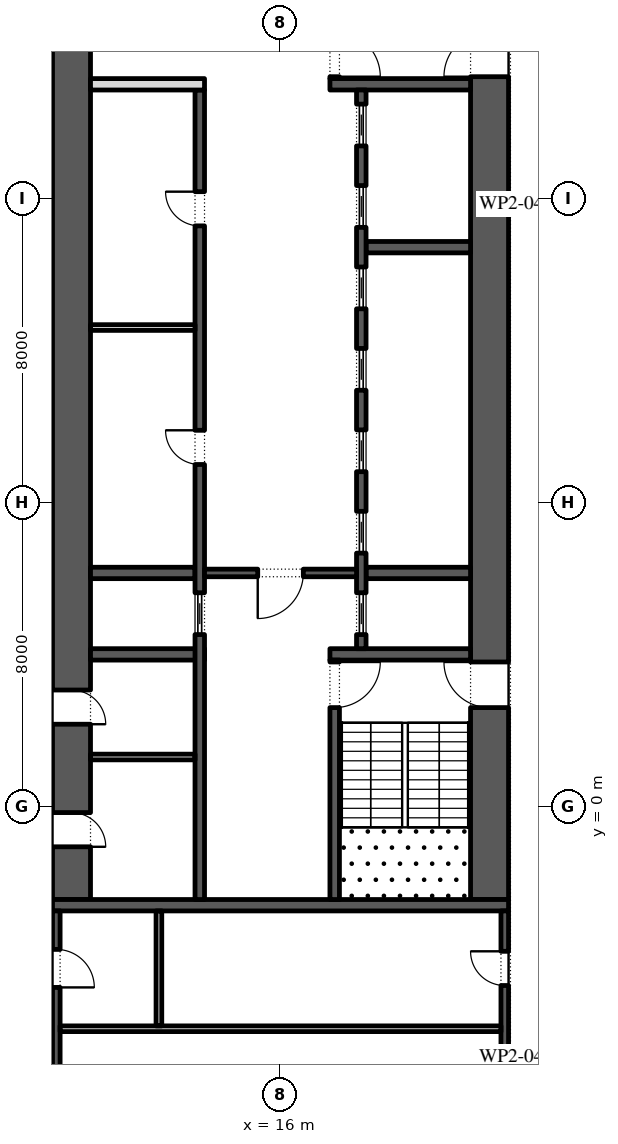
"""IFC4 building model, lengths in metres.
Left out: names, types, materials, properties, quantities, classifications, styles, units other than length and angle.
Written with IfcOpenShell. Run it as: python <this file> out.ifc"""

import sys

from ifc_helpers import new_model, si_unit, direction, frame, frame_2d, origin, place, context, subcontext, project, spatial, rectangle, extrude, element, fill, save


model = new_model("IFC4")
c1 = context("Model", 3, precision=1e-05, world=origin(), true_north=direction((0.0, 1.0)))
c2 = subcontext(c1, "Body", "Model", "MODEL_VIEW")
j1 = project(units=[si_unit("LENGTHUNIT", "METRE"), si_unit("PLANEANGLEUNIT", "RADIAN")], contexts=[c1])
p1 = place(None, origin())
s1 = spatial("IfcSite", under=j1, at=p1, CompositionType="ELEMENT")
p2 = place(p1, origin())
s2 = spatial("IfcBuilding", under=s1, at=p2, CompositionType="ELEMENT")
p3 = place(p2, frame((0.0, 0.0, 69.0)))
s3 = spatial("IfcBuildingStorey", under=s2, at=p3, CompositionType="ELEMENT", Elevation=69.0)
p4 = place(p3, frame((21.5, -2.45, 0.0), z_axis=(0.0, 0.0, 1.0), x_axis=(0.0, 1.0, 0.0)))
e1 = element("IfcWall", 1, at=p4, inside=s3, PredefinedType="SHEAR", context=c2, shape_type="SweptSolid", body=[
    extrude(rectangle(XDim=27.9, YDim=1.0, at=frame_2d((13.95, 0.0))), origin(), (0.0, 0.0, 1.0), 4.0),
])
p5 = place(p4, frame((5.05, 0.0, 0.0)))
e2 = element("IfcOpeningElement", 2, at=p5, cuts=e1, PredefinedType="OPENING", context=c2, shape_type="SweptSolid", body=[
    extrude(rectangle(XDim=1.2, YDim=2.1, at=frame_2d((0.6, 1.05))), frame((0.0, 0.51, 0.0), z_axis=(0.0, -1.0, 0.0), x_axis=(1.0, 0.0, 0.0)), (0.0, 0.0, 1.0), 1.02),
])
p6 = place(p4, frame((21.65, 0.0, 0.0)))
e3 = element("IfcOpeningElement", 3, at=p6, cuts=e1, PredefinedType="OPENING", context=c2, shape_type="SweptSolid", body=[
    extrude(rectangle(XDim=1.2, YDim=2.1, at=frame_2d((0.6, 1.05))), frame((0.0, 0.51, 0.0), z_axis=(0.0, -1.0, 0.0), x_axis=(1.0, 0.0, 0.0)), (0.0, 0.0, 1.0), 1.02),
])
p7 = place(p3, frame((10.5, -2.45, 0.0), z_axis=(0.0, 0.0, 1.0), x_axis=(0.0, 1.0, 0.0)))
e4 = element("IfcWall", 4, at=p7, inside=s3, PredefinedType="SHEAR", context=c2, shape_type="SweptSolid", body=[
    extrude(rectangle(XDim=27.9, YDim=1.0, at=frame_2d((13.95, 0.0))), origin(), (0.0, 0.0, 1.0), 4.0),
])
p8 = place(p7, frame((23.65, 0.0, 0.0)))
e5 = element("IfcOpeningElement", 5, at=p8, cuts=e4, PredefinedType="OPENING", context=c2, shape_type="SweptSolid", body=[
    extrude(rectangle(XDim=2.4, YDim=2.1, at=frame_2d((1.2, 1.05))), frame((0.0, 0.51, 0.0), z_axis=(0.0, -1.0, 0.0), x_axis=(1.0, 0.0, 0.0)), (0.0, 0.0, 1.0), 1.02),
])
p9 = place(p7, frame((1.387, 0.0, 0.0)))
e6 = element("IfcOpeningElement", 6, at=p9, cuts=e4, PredefinedType="OPENING", context=c2, shape_type="SweptSolid", body=[
    extrude(rectangle(XDim=0.9, YDim=2.1, at=frame_2d((0.45, 1.05))), frame((0.0, 0.51, 0.0), z_axis=(0.0, -1.0, 0.0), x_axis=(1.0, 0.0, 0.0)), (0.0, 0.0, 1.0), 1.02),
])
p10 = place(p7, frame((4.613, 0.0, 0.0)))
e7 = element("IfcOpeningElement", 7, at=p10, cuts=e4, PredefinedType="OPENING", context=c2, shape_type="SweptSolid", body=[
    extrude(rectangle(XDim=0.9, YDim=2.1, at=frame_2d((0.45, 1.05))), frame((0.0, 0.51, 0.0), z_axis=(0.0, -1.0, 0.0), x_axis=(1.0, 0.0, 0.0)), (0.0, 0.0, 1.0), 1.02),
])
p11 = place(p3, frame((10.0, -2.6, 0.0), z_axis=(0.0, 0.0, 1.0), x_axis=(1.0, 0.0, 0.0)))
e8 = element("IfcWall", 8, at=p11, inside=s3, PredefinedType="SHEAR", context=c2, shape_type="SweptSolid", body=[
    extrude(rectangle(XDim=12.0, YDim=0.3, at=frame_2d((6.0, 0.0))), origin(), (0.0, 0.0, 1.0), 4.0),
])
p12 = place(p3, frame((17.3, 4.0, 0.0), z_axis=(0.0, 0.0, 1.0), x_axis=(1.0, 0.0, 0.0)))
e9 = element("IfcWall", 9, at=p12, inside=s3, PredefinedType="SHEAR", context=c2, shape_type="SweptSolid", body=[
    extrude(rectangle(XDim=3.7, YDim=0.3, at=frame_2d((1.85, 0.0))), origin(), (0.0, 0.0, 1.0), 4.0),
])
p13 = place(p3, frame((17.425, -2.45, 0.0), z_axis=(0.0, 0.0, 1.0), x_axis=(0.0, 1.0, 0.0)))
e10 = element("IfcWall", 10, at=p13, inside=s3, PredefinedType="SHEAR", context=c2, shape_type="SweptSolid", body=[
    extrude(rectangle(XDim=6.3, YDim=0.25, at=frame_2d((3.15, 0.0))), origin(), (0.0, 0.0, 1.0), 4.0),
])
p14 = place(p13, frame((5.05, 0.0, 0.0)))
e11 = element("IfcOpeningElement", 11, at=p14, cuts=e10, PredefinedType="OPENING", context=c2, shape_type="SweptSolid", body=[
    extrude(rectangle(XDim=1.2, YDim=2.1, at=frame_2d((0.6, 1.05))), frame((0.0, 0.135, 0.0), z_axis=(0.0, -1.0, 0.0), x_axis=(1.0, 0.0, 0.0)), (0.0, 0.0, 1.0), 0.27),
])
p15 = place(p3, frame((17.3, 19.0, 0.0), z_axis=(0.0, 0.0, 1.0), x_axis=(1.0, 0.0, 0.0)))
e12 = element("IfcWall", 12, at=p15, inside=s3, PredefinedType="SHEAR", context=c2, shape_type="SweptSolid", body=[
    extrude(rectangle(XDim=3.7, YDim=0.3, at=frame_2d((1.85, 0.0))), origin(), (0.0, 0.0, 1.0), 4.0),
])
p16 = place(p3, frame((17.425, 19.15, 0.0), z_axis=(0.0, 0.0, 1.0), x_axis=(0.0, 1.0, 0.0)))
e13 = element("IfcWall", 13, at=p16, inside=s3, PredefinedType="SHEAR", context=c2, shape_type="SweptSolid", body=[
    extrude(rectangle(XDim=6.3, YDim=0.25, at=frame_2d((3.15, 0.0))), origin(), (0.0, 0.0, 1.0), 4.0),
])
p17 = place(p16, frame((0.05, 0.0, 0.0)))
e14 = element("IfcOpeningElement", 14, at=p17, cuts=e13, PredefinedType="OPENING", context=c2, shape_type="SweptSolid", body=[
    extrude(rectangle(XDim=1.2, YDim=2.1, at=frame_2d((0.6, 1.05))), frame((0.0, 0.135, 0.0), z_axis=(0.0, -1.0, 0.0), x_axis=(1.0, 0.0, 0.0)), (0.0, 0.0, 1.0), 0.27),
])
for number, where, z_axis, x_axis in (
    (15, (18.25, 6.143, 0.0), (0.0, 0.0, 1.0), (1.0, 0.0, 0.0)),
    (16, (18.25, 14.714, 0.0), (0.0, 0.0, 1.0), (1.0, 0.0, 0.0)),
):
    element("IfcWall", number, at=place(p3, frame(where, z_axis=z_axis, x_axis=x_axis)), inside=s3, PredefinedType="SHEAR", context=c2, shape_type="SweptSolid", body=[
        extrude(rectangle(XDim=2.75, YDim=0.3, at=frame_2d((1.375, 0.0))), origin(), (0.0, 0.0, 1.0), 4.0),
    ])
p18 = place(p3, frame((18.125, 4.15, 0.0), z_axis=(0.0, 0.0, 1.0), x_axis=(0.0, 1.0, 0.0)))
e17 = element("IfcWall", 17, at=p18, inside=s3, PredefinedType="SHEAR", context=c2, shape_type="SweptSolid", body=[
    extrude(rectangle(XDim=14.7, YDim=0.25, at=frame_2d((7.35, 0.0))), origin(), (0.0, 0.0, 1.0), 4.0),
])
p19 = place(p18, frame((0.371, 0.0, 0.0)))
e18 = element("IfcOpeningElement", 18, at=p19, cuts=e17, PredefinedType="OPENING", context=c2, shape_type="SweptSolid", body=[
    extrude(rectangle(XDim=1.1, YDim=2.1, at=frame_2d((0.55, 1.05))), frame((0.0, 0.135, 0.0), z_axis=(0.0, -1.0, 0.0), x_axis=(1.0, 0.0, 0.0)), (0.0, 0.0, 1.0), 0.27),
])
p20 = place(p18, frame((2.514, 0.0, 0.0)))
e19 = element("IfcOpeningElement", 19, at=p20, cuts=e17, PredefinedType="OPENING", context=c2, shape_type="SweptSolid", body=[
    extrude(rectangle(XDim=1.1, YDim=2.1, at=frame_2d((0.55, 1.05))), frame((0.0, 0.135, 0.0), z_axis=(0.0, -1.0, 0.0), x_axis=(1.0, 0.0, 0.0)), (0.0, 0.0, 1.0), 0.27),
])
p21 = place(p18, frame((4.657, 0.0, 0.0)))
e20 = element("IfcOpeningElement", 20, at=p21, cuts=e17, PredefinedType="OPENING", context=c2, shape_type="SweptSolid", body=[
    extrude(rectangle(XDim=1.1, YDim=2.1, at=frame_2d((0.55, 1.05))), frame((0.0, 0.135, 0.0), z_axis=(0.0, -1.0, 0.0), x_axis=(1.0, 0.0, 0.0)), (0.0, 0.0, 1.0), 0.27),
])
p22 = place(p18, frame((6.8, 0.0, 0.0)))
e21 = element("IfcOpeningElement", 21, at=p22, cuts=e17, PredefinedType="OPENING", context=c2, shape_type="SweptSolid", body=[
    extrude(rectangle(XDim=1.1, YDim=2.1, at=frame_2d((0.55, 1.05))), frame((0.0, 0.135, 0.0), z_axis=(0.0, -1.0, 0.0), x_axis=(1.0, 0.0, 0.0)), (0.0, 0.0, 1.0), 0.27),
])
p23 = place(p18, frame((8.943, 0.0, 0.0)))
e22 = element("IfcOpeningElement", 22, at=p23, cuts=e17, PredefinedType="OPENING", context=c2, shape_type="SweptSolid", body=[
    extrude(rectangle(XDim=1.1, YDim=2.1, at=frame_2d((0.55, 1.05))), frame((0.0, 0.135, 0.0), z_axis=(0.0, -1.0, 0.0), x_axis=(1.0, 0.0, 0.0)), (0.0, 0.0, 1.0), 0.27),
])
p24 = place(p18, frame((11.086, 0.0, 0.0)))
e23 = element("IfcOpeningElement", 23, at=p24, cuts=e17, PredefinedType="OPENING", context=c2, shape_type="SweptSolid", body=[
    extrude(rectangle(XDim=1.1, YDim=2.1, at=frame_2d((0.55, 1.05))), frame((0.0, 0.135, 0.0), z_axis=(0.0, -1.0, 0.0), x_axis=(1.0, 0.0, 0.0)), (0.0, 0.0, 1.0), 0.27),
])
p25 = place(p18, frame((13.229, 0.0, 0.0)))
e24 = element("IfcOpeningElement", 24, at=p25, cuts=e17, PredefinedType="OPENING", context=c2, shape_type="SweptSolid", body=[
    extrude(rectangle(XDim=1.1, YDim=2.1, at=frame_2d((0.55, 1.05))), frame((0.0, 0.135, 0.0), z_axis=(0.0, -1.0, 0.0), x_axis=(1.0, 0.0, 0.0)), (0.0, 0.0, 1.0), 0.27),
])
p26 = place(p3, frame((11.0, 4.0, 0.0), z_axis=(0.0, 0.0, 1.0), x_axis=(1.0, 0.0, 0.0)))
e25 = element("IfcWall", 25, at=p26, inside=s3, PredefinedType="SHEAR", context=c2, shape_type="SweptSolid", body=[
    extrude(rectangle(XDim=3.0, YDim=0.3, at=frame_2d((1.5, 0.0))), origin(), (0.0, 0.0, 1.0), 4.0),
])
p27 = place(p3, frame((11.0, 6.143, 0.0), z_axis=(0.0, 0.0, 1.0), x_axis=(1.0, 0.0, 0.0)))
e26 = element("IfcWall", 26, at=p27, inside=s3, PredefinedType="SHEAR", context=c2, shape_type="SweptSolid", body=[
    extrude(rectangle(XDim=2.75, YDim=0.3, at=frame_2d((1.375, 0.0))), origin(), (0.0, 0.0, 1.0), 4.0),
])
p28 = place(p3, frame((13.875, -2.45, 0.0), z_axis=(0.0, 0.0, 1.0), x_axis=(0.0, 1.0, 0.0)))
e27 = element("IfcWall", 27, at=p28, inside=s3, PredefinedType="SHEAR", context=c2, shape_type="SweptSolid", body=[
    extrude(rectangle(XDim=21.3, YDim=0.25, at=frame_2d((10.65, 0.0))), origin(), (0.0, 0.0, 1.0), 4.0),
])
p29 = place(p28, frame((11.446, 0.0, 0.0)))
e28 = element("IfcOpeningElement", 28, at=p29, cuts=e27, PredefinedType="OPENING", context=c2, shape_type="SweptSolid", body=[
    extrude(rectangle(XDim=0.9, YDim=2.1, at=frame_2d((0.45, 1.05))), frame((0.0, 0.135, 0.0), z_axis=(0.0, -1.0, 0.0), x_axis=(1.0, 0.0, 0.0)), (0.0, 0.0, 1.0), 0.27),
])
p30 = place(p28, frame((17.725, 0.0, 0.0)))
e29 = element("IfcOpeningElement", 29, at=p30, cuts=e27, PredefinedType="OPENING", context=c2, shape_type="SweptSolid", body=[
    extrude(rectangle(XDim=0.9, YDim=2.1, at=frame_2d((0.45, 1.05))), frame((0.0, 0.135, 0.0), z_axis=(0.0, -1.0, 0.0), x_axis=(1.0, 0.0, 0.0)), (0.0, 0.0, 1.0), 0.27),
])
p31 = place(p28, frame((6.971, 0.0, 0.0)))
e30 = element("IfcOpeningElement", 30, at=p31, cuts=e27, PredefinedType="OPENING", context=c2, shape_type="SweptSolid", body=[
    extrude(rectangle(XDim=1.1, YDim=2.1, at=frame_2d((0.55, 1.05))), frame((0.0, 0.135, 0.0), z_axis=(0.0, -1.0, 0.0), x_axis=(1.0, 0.0, 0.0)), (0.0, 0.0, 1.0), 0.27),
])
p32 = place(p3, frame((11.0, 19.0, 0.0), z_axis=(0.0, 0.0, 1.0), x_axis=(1.0, 0.0, 0.0)))
e31 = element("IfcWall", 31, at=p32, inside=s3, PredefinedType="PARTITIONING", context=c2, shape_type="SweptSolid", body=[
    extrude(rectangle(XDim=3.0, YDim=0.3, at=frame_2d((1.5, 0.0))), origin(), (0.0, 0.0, 1.0), 4.0),
])
p33 = place(p3, frame((11.0, 12.6, 0.0), z_axis=(0.0, 0.0, 1.0), x_axis=(1.0, 0.0, 0.0)))
e32 = element("IfcWall", 32, at=p33, inside=s3, PredefinedType="PARTITIONING", context=c2, shape_type="SweptSolid", body=[
    extrude(rectangle(XDim=2.75, YDim=0.15, at=frame_2d((1.375, 0.0))), origin(), (0.0, 0.0, 1.0), 4.0),
])
p34 = place(p3, frame((14.0, 6.143, 0.0), z_axis=(0.0, 0.0, 1.0), x_axis=(1.0, 0.0, 0.0)))
e33 = element("IfcWall", 33, at=p34, inside=s3, PredefinedType="SHEAR", context=c2, shape_type="SweptSolid", body=[
    extrude(rectangle(XDim=4.0, YDim=0.2, at=frame_2d((2.0, 0.0))), origin(), (0.0, 0.0, 1.0), 4.0),
])
p35 = place(p34, frame((1.4, 0.0, 0.0)))
e34 = element("IfcOpeningElement", 34, at=p35, cuts=e33, PredefinedType="OPENING", context=c2, shape_type="SweptSolid", body=[
    extrude(rectangle(XDim=1.2, YDim=2.1, at=frame_2d((0.6, 1.05))), frame((0.0, 0.11, 0.0), z_axis=(0.0, -1.0, 0.0), x_axis=(1.0, 0.0, 0.0)), (0.0, 0.0, 1.0), 0.22),
])
p36 = place(p3, frame((11.0, 1.3, 0.0), z_axis=(0.0, 0.0, 1.0), x_axis=(1.0, 0.0, 0.0)))
e35 = element("IfcWall", 35, at=p36, inside=s3, PredefinedType="PARTITIONING", context=c2, shape_type="SweptSolid", body=[
    extrude(rectangle(XDim=2.75, YDim=0.15, at=frame_2d((1.375, 0.0))), origin(), (0.0, 0.0, 1.0), 4.0),
])
p37 = place(p3, frame((21.9, -15.8, 0.0), z_axis=(0.0, 0.0, 1.0), x_axis=(0.0, 1.0, 0.0)))
e36 = element("IfcWall", 36, at=p37, inside=s3, PredefinedType="SHEAR", context=c2, shape_type="SweptSolid", body=[
    extrude(rectangle(XDim=13.05, YDim=0.2, at=frame_2d((6.525, 0.0))), origin(), (0.0, 0.0, 1.0), 4.0),
])
p38 = place(p37, frame((11.087, 0.0, 0.0)))
e37 = element("IfcOpeningElement", 37, at=p38, cuts=e36, PredefinedType="OPENING", context=c2, shape_type="SweptSolid", body=[
    extrude(rectangle(XDim=0.9, YDim=2.1, at=frame_2d((0.45, 1.05))), frame((0.0, 0.11, 0.0), z_axis=(0.0, -1.0, 0.0), x_axis=(1.0, 0.0, 0.0)), (0.0, 0.0, 1.0), 0.22),
])
p39 = place(p3, frame((10.1, -15.8, 0.0), z_axis=(0.0, 0.0, 1.0), x_axis=(0.0, 1.0, 0.0)))
e38 = element("IfcWall", 38, at=p39, inside=s3, PredefinedType="SHEAR", context=c2, shape_type="SweptSolid", body=[
    extrude(rectangle(XDim=13.05, YDim=0.2, at=frame_2d((6.525, 0.0))), origin(), (0.0, 0.0, 1.0), 4.0),
])
p40 = place(p39, frame((4.488, 0.0, 0.0)))
e39 = element("IfcOpeningElement", 39, at=p40, cuts=e38, PredefinedType="OPENING", context=c2, shape_type="SweptSolid", body=[
    extrude(rectangle(XDim=0.9, YDim=2.1, at=frame_2d((0.45, 1.05))), frame((0.0, 0.11, 0.0), z_axis=(0.0, -1.0, 0.0), x_axis=(1.0, 0.0, 0.0)), (0.0, 0.0, 1.0), 0.22),
])
p41 = place(p39, frame((11.038, 0.0, 0.0)))
e40 = element("IfcOpeningElement", 40, at=p41, cuts=e38, PredefinedType="OPENING", context=c2, shape_type="SweptSolid", body=[
    extrude(rectangle(XDim=1.0, YDim=2.1, at=frame_2d((0.5, 1.05))), frame((0.0, 0.11, 0.0), z_axis=(0.0, -1.0, 0.0), x_axis=(1.0, 0.0, 0.0)), (0.0, 0.0, 1.0), 0.22),
])
p42 = place(p3, frame((10.2, -5.85, 0.0), z_axis=(0.0, 0.0, 1.0), x_axis=(1.0, 0.0, 0.0)))
e41 = element("IfcWall", 41, at=p42, inside=s3, PredefinedType="PARTITIONING", context=c2, shape_type="SweptSolid", body=[
    extrude(rectangle(XDim=11.6, YDim=0.15, at=frame_2d((5.8, 0.0))), origin(), (0.0, 0.0, 1.0), 4.0),
])
p43 = place(p3, frame((12.8, -5.775, 0.0), z_axis=(0.0, 0.0, 1.0), x_axis=(0.0, 1.0, 0.0)))
e42 = element("IfcWall", 42, at=p43, inside=s3, PredefinedType="PARTITIONING", context=c2, shape_type="SweptSolid", body=[
    extrude(rectangle(XDim=3.025, YDim=0.15, at=frame_2d((1.512, 0.0))), origin(), (0.0, 0.0, 1.0), 4.0),
])
p44 = place(p19, origin())
e43 = element("IfcDoor", 43, at=p44, inside=s3, OperationType="SLIDING_TO_LEFT", PredefinedType="DOOR", context=c2, shape_type="SweptSolid", body=[
    extrude(rectangle(XDim=1.1, YDim=2.1, at=frame_2d((0.55, 1.05))), frame((0.0, 0.025, 0.0), z_axis=(0.0, -1.0, 0.0), x_axis=(1.0, 0.0, 0.0)), (0.0, 0.0, 1.0), 0.05),
])
fill(e18, e43)
p45 = place(p20, origin())
e44 = element("IfcDoor", 44, at=p45, inside=s3, OperationType="SLIDING_TO_LEFT", PredefinedType="DOOR", context=c2, shape_type="SweptSolid", body=[
    extrude(rectangle(XDim=1.1, YDim=2.1, at=frame_2d((0.55, 1.05))), frame((0.0, 0.025, 0.0), z_axis=(0.0, -1.0, 0.0), x_axis=(1.0, 0.0, 0.0)), (0.0, 0.0, 1.0), 0.05),
])
fill(e19, e44)
p46 = place(p21, origin())
e45 = element("IfcDoor", 45, at=p46, inside=s3, OperationType="SLIDING_TO_LEFT", PredefinedType="DOOR", context=c2, shape_type="SweptSolid", body=[
    extrude(rectangle(XDim=1.1, YDim=2.1, at=frame_2d((0.55, 1.05))), frame((0.0, 0.025, 0.0), z_axis=(0.0, -1.0, 0.0), x_axis=(1.0, 0.0, 0.0)), (0.0, 0.0, 1.0), 0.05),
])
fill(e20, e45)
p47 = place(p22, origin())
e46 = element("IfcDoor", 46, at=p47, inside=s3, OperationType="SLIDING_TO_LEFT", PredefinedType="DOOR", context=c2, shape_type="SweptSolid", body=[
    extrude(rectangle(XDim=1.1, YDim=2.1, at=frame_2d((0.55, 1.05))), frame((0.0, 0.025, 0.0), z_axis=(0.0, -1.0, 0.0), x_axis=(1.0, 0.0, 0.0)), (0.0, 0.0, 1.0), 0.05),
])
fill(e21, e46)
p48 = place(p23, origin())
e47 = element("IfcDoor", 47, at=p48, inside=s3, OperationType="SLIDING_TO_LEFT", PredefinedType="DOOR", context=c2, shape_type="SweptSolid", body=[
    extrude(rectangle(XDim=1.1, YDim=2.1, at=frame_2d((0.55, 1.05))), frame((0.0, 0.025, 0.0), z_axis=(0.0, -1.0, 0.0), x_axis=(1.0, 0.0, 0.0)), (0.0, 0.0, 1.0), 0.05),
])
fill(e22, e47)
p49 = place(p24, origin())
e48 = element("IfcDoor", 48, at=p49, inside=s3, OperationType="SLIDING_TO_LEFT", PredefinedType="DOOR", context=c2, shape_type="SweptSolid", body=[
    extrude(rectangle(XDim=1.1, YDim=2.1, at=frame_2d((0.55, 1.05))), frame((0.0, 0.025, 0.0), z_axis=(0.0, -1.0, 0.0), x_axis=(1.0, 0.0, 0.0)), (0.0, 0.0, 1.0), 0.05),
])
fill(e23, e48)
p50 = place(p25, origin())
e49 = element("IfcDoor", 49, at=p50, inside=s3, OperationType="SLIDING_TO_LEFT", PredefinedType="DOOR", context=c2, shape_type="SweptSolid", body=[
    extrude(rectangle(XDim=1.1, YDim=2.1, at=frame_2d((0.55, 1.05))), frame((0.0, 0.025, 0.0), z_axis=(0.0, -1.0, 0.0), x_axis=(1.0, 0.0, 0.0)), (0.0, 0.0, 1.0), 0.05),
])
fill(e24, e49)
p51 = place(p29, origin())
e50 = element("IfcDoor", 50, at=p51, inside=s3, OperationType="SINGLE_SWING_LEFT", PredefinedType="DOOR", context=c2, shape_type="SweptSolid", body=[
    extrude(rectangle(XDim=0.9, YDim=2.1, at=frame_2d((0.45, 1.05))), frame((0.0, 0.125, 0.0), z_axis=(0.0, -1.0, 0.0), x_axis=(1.0, 0.0, 0.0)), (0.0, 0.0, 1.0), 0.05),
])
fill(e28, e50)
p52 = place(p30, origin())
e51 = element("IfcDoor", 51, at=p52, inside=s3, OperationType="SINGLE_SWING_LEFT", PredefinedType="DOOR", context=c2, shape_type="SweptSolid", body=[
    extrude(rectangle(XDim=0.9, YDim=2.1, at=frame_2d((0.45, 1.05))), frame((0.0, 0.125, 0.0), z_axis=(0.0, -1.0, 0.0), x_axis=(1.0, 0.0, 0.0)), (0.0, 0.0, 1.0), 0.05),
])
fill(e29, e51)
p53 = place(p31, origin())
e52 = element("IfcDoor", 52, at=p53, inside=s3, OperationType="SLIDING_TO_LEFT", PredefinedType="DOOR", context=c2, shape_type="SweptSolid", body=[
    extrude(rectangle(XDim=1.1, YDim=2.1, at=frame_2d((0.55, 1.05))), frame((0.0, 0.025, 0.0), z_axis=(0.0, -1.0, 0.0), x_axis=(1.0, 0.0, 0.0)), (0.0, 0.0, 1.0), 0.05),
])
fill(e30, e52)
p54 = place(p35, frame((1.2, 0.0, 0.0), z_axis=(0.0, 0.0, 1.0), x_axis=(-1.0, 0.0, 0.0)))
e53 = element("IfcDoor", 53, at=p54, inside=s3, OperationType="SINGLE_SWING_LEFT", PredefinedType="DOOR", context=c2, shape_type="SweptSolid", body=[
    extrude(rectangle(XDim=1.2, YDim=2.1, at=frame_2d((0.6, 1.05))), frame((0.0, 0.025, 0.0), z_axis=(0.0, -1.0, 0.0), x_axis=(1.0, 0.0, 0.0)), (0.0, 0.0, 1.0), 0.05),
])
fill(e34, e53)
p55 = place(p14, frame((1.2, 0.0, 0.0), z_axis=(0.0, 0.0, 1.0), x_axis=(-1.0, 0.0, 0.0)))
e54 = element("IfcDoor", 54, at=p55, inside=s3, OperationType="SINGLE_SWING_RIGHT", PredefinedType="DOOR", context=c2, shape_type="SweptSolid", body=[
    extrude(rectangle(XDim=1.2, YDim=2.1, at=frame_2d((0.6, 1.05))), frame((0.0, 0.025, 0.0), z_axis=(0.0, -1.0, 0.0), x_axis=(1.0, 0.0, 0.0)), (0.0, 0.0, 1.0), 0.05),
])
fill(e11, e54)
p56 = place(p5, origin())
e55 = element("IfcDoor", 55, at=p56, inside=s3, OperationType="SINGLE_SWING_LEFT", PredefinedType="DOOR", context=c2, shape_type="SweptSolid", body=[
    extrude(rectangle(XDim=1.2, YDim=2.1, at=frame_2d((0.6, 1.05))), frame((0.0, 0.025, 0.0), z_axis=(0.0, -1.0, 0.0), x_axis=(1.0, 0.0, 0.0)), (0.0, 0.0, 1.0), 0.05),
])
fill(e2, e55)
p57 = place(p17, frame((1.2, 0.0, 0.0), z_axis=(0.0, 0.0, 1.0), x_axis=(-1.0, 0.0, 0.0)))
e56 = element("IfcDoor", 56, at=p57, inside=s3, OperationType="SINGLE_SWING_LEFT", PredefinedType="DOOR", context=c2, shape_type="SweptSolid", body=[
    extrude(rectangle(XDim=1.2, YDim=2.1, at=frame_2d((0.6, 1.05))), frame((0.0, 0.025, 0.0), z_axis=(0.0, -1.0, 0.0), x_axis=(1.0, 0.0, 0.0)), (0.0, 0.0, 1.0), 0.05),
])
fill(e14, e56)
p58 = place(p6, origin())
e57 = element("IfcDoor", 57, at=p58, inside=s3, OperationType="SINGLE_SWING_RIGHT", PredefinedType="DOOR", context=c2, shape_type="SweptSolid", body=[
    extrude(rectangle(XDim=1.2, YDim=2.1, at=frame_2d((0.6, 1.05))), frame((0.0, 0.025, 0.0), z_axis=(0.0, -1.0, 0.0), x_axis=(1.0, 0.0, 0.0)), (0.0, 0.0, 1.0), 0.05),
])
fill(e3, e57)
p59 = place(p9, frame((0.9, -0.95, 0.0), z_axis=(0.0, 0.0, 1.0), x_axis=(-1.0, 0.0, 0.0)))
e58 = element("IfcDoor", 58, at=p59, inside=s3, OperationType="SINGLE_SWING_LEFT", PredefinedType="DOOR", context=c2, shape_type="SweptSolid", body=[
    extrude(rectangle(XDim=0.9, YDim=2.1, at=frame_2d((0.45, 1.05))), frame((0.0, -0.45, 0.0), z_axis=(0.0, -1.0, 0.0), x_axis=(1.0, 0.0, 0.0)), (0.0, 0.0, 1.0), 0.05),
])
fill(e6, e58)
p60 = place(p10, frame((0.9, -0.95, 0.0), z_axis=(0.0, 0.0, 1.0), x_axis=(-1.0, 0.0, 0.0)))
e59 = element("IfcDoor", 59, at=p60, inside=s3, OperationType="SINGLE_SWING_LEFT", PredefinedType="DOOR", context=c2, shape_type="SweptSolid", body=[
    extrude(rectangle(XDim=0.9, YDim=2.1, at=frame_2d((0.45, 1.05))), frame((0.0, -0.45, 0.0), z_axis=(0.0, -1.0, 0.0), x_axis=(1.0, 0.0, 0.0)), (0.0, 0.0, 1.0), 0.05),
])
fill(e7, e59)
p61 = place(p41, frame((1.0, -0.15, 0.0), z_axis=(0.0, 0.0, 1.0), x_axis=(-1.0, 0.0, 0.0)))
e60 = element("IfcDoor", 60, at=p61, inside=s3, OperationType="SINGLE_SWING_LEFT", PredefinedType="DOOR", context=c2, shape_type="SweptSolid", body=[
    extrude(rectangle(XDim=1.0, YDim=2.1, at=frame_2d((0.5, 1.05))), frame((0.0, -0.05, 0.0), z_axis=(0.0, -1.0, 0.0), x_axis=(1.0, 0.0, 0.0)), (0.0, 0.0, 1.0), 0.05),
])
fill(e40, e60)
p62 = place(p38, origin())
e61 = element("IfcDoor", 61, at=p62, inside=s3, OperationType="SINGLE_SWING_LEFT", PredefinedType="DOOR", context=c2, shape_type="SweptSolid", body=[
    extrude(rectangle(XDim=0.9, YDim=2.1, at=frame_2d((0.45, 1.05))), frame((0.0, 0.1, 0.0), z_axis=(0.0, -1.0, 0.0), x_axis=(1.0, 0.0, 0.0)), (0.0, 0.0, 1.0), 0.05),
])
fill(e37, e61)
save(model, sys.argv[1])
